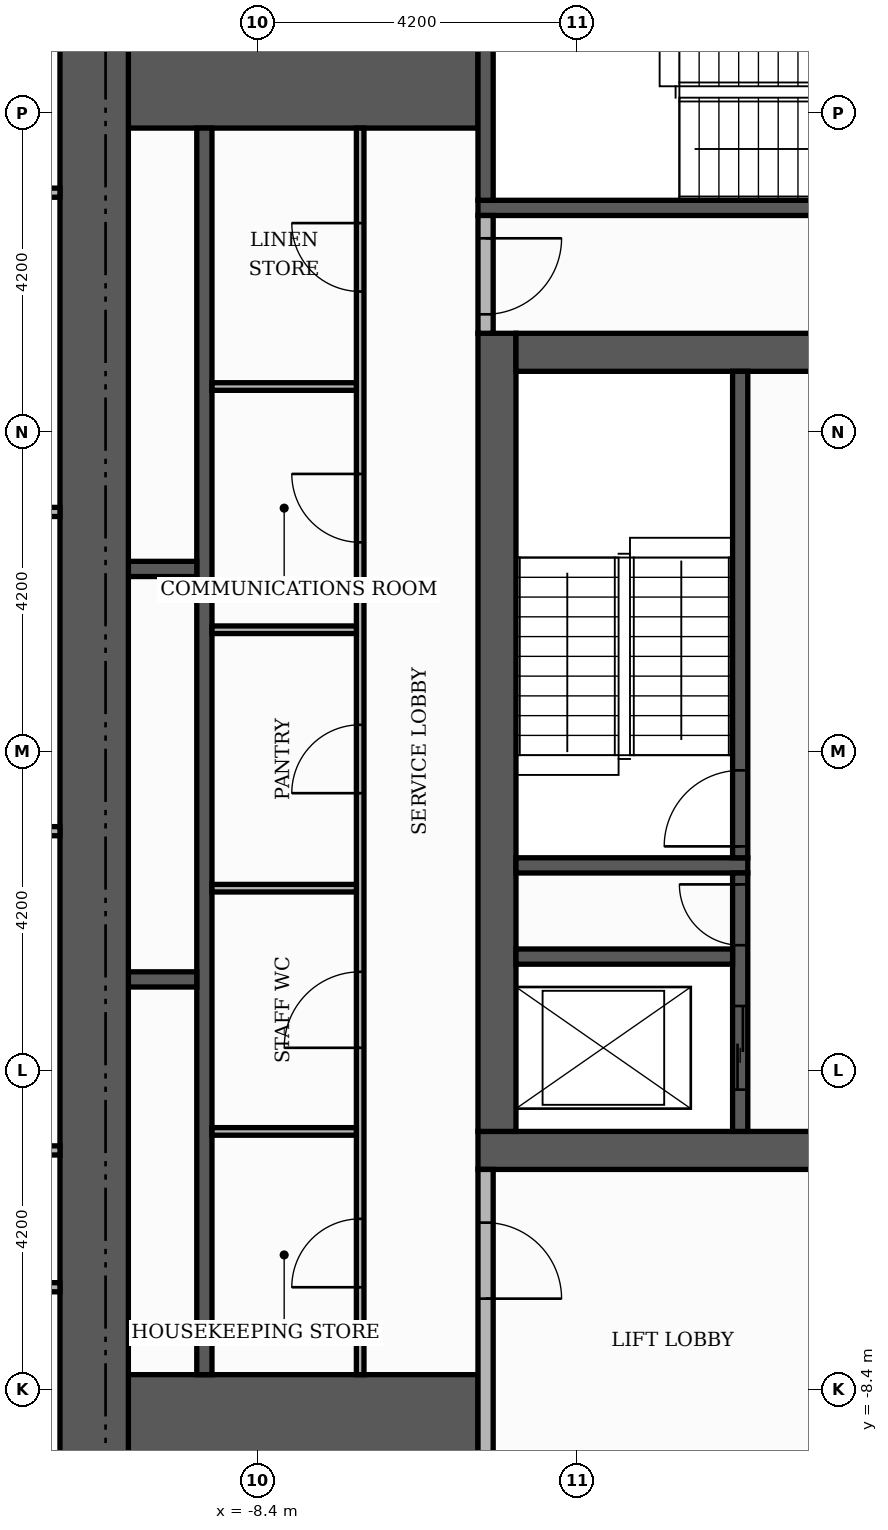
"""IFC4 building model, lengths in metres.
Left out: names, types, materials, properties, quantities, classifications, styles, units other than length and angle.
Written with IfcOpenShell. Run it as: python <this file> out.ifc"""

import sys

from ifc_helpers import new_model, si_unit, direction, frame, frame_2d, origin, place, context, subcontext, project, spatial, rectangle, extrude, element, fill, save


model = new_model("IFC4")
c1 = context("Model", 3, precision=1e-05, world=origin(), true_north=direction((0.0, 1.0)))
c2 = subcontext(c1, "Body", "Model", "MODEL_VIEW")
j1 = project(units=[si_unit("LENGTHUNIT", "METRE"), si_unit("PLANEANGLEUNIT", "RADIAN")], contexts=[c1])
p1 = place(None, origin())
s1 = spatial("IfcSite", under=j1, at=p1, CompositionType="ELEMENT")
p2 = place(p1, origin())
s2 = spatial("IfcBuilding", under=s1, at=p2, CompositionType="ELEMENT")
p3 = place(p2, frame((0.0, 0.0, 267.9)))
s3 = spatial("IfcBuildingStorey", under=s2, at=p3, CompositionType="ELEMENT", Elevation=267.9)
p4 = place(p3, frame((-5.5, -5.25, 0.0), z_axis=(0.0, 0.0, 1.0), x_axis=(1.0, 0.0, 0.0)))
e1 = element("IfcWall", 1, at=p4, inside=s3, PredefinedType="SHEAR", context=c2, shape_type="SweptSolid", body=[
    extrude(rectangle(XDim=11.0, YDim=0.5, at=frame_2d((5.5, 0.0))), origin(), (0.0, 0.0, 1.0), 3.48),
])
p5 = place(p4, frame((4.9, 0.0, 0.0)))
e2 = element("IfcOpeningElement", 2, at=p5, cuts=e1, PredefinedType="OPENING", context=c2, shape_type="SweptSolid", body=[
    extrude(rectangle(XDim=1.2, YDim=2.1, at=frame_2d((0.6, 1.05))), frame((0.0, 0.26, 0.0), z_axis=(0.0, -1.0, 0.0), x_axis=(1.0, 0.0, 0.0)), (0.0, 0.0, 1.0), 0.52),
])
p6 = place(p3, frame((-5.25, -5.0, 0.0), z_axis=(0.0, 0.0, 1.0), x_axis=(0.0, 1.0, 0.0)))
e3 = element("IfcWall", 3, at=p6, inside=s3, PredefinedType="SHEAR", context=c2, shape_type="SweptSolid", body=[
    extrude(rectangle(XDim=10.5, YDim=0.5, at=frame_2d((5.25, 0.0))), origin(), (0.0, 0.0, 1.0), 3.48),
])
p7 = place(p3, frame((-5.0, 5.25, 0.0), z_axis=(0.0, 0.0, 1.0), x_axis=(1.0, 0.0, 0.0)))
e4 = element("IfcWall", 4, at=p7, inside=s3, PredefinedType="SHEAR", context=c2, shape_type="SweptSolid", body=[
    extrude(rectangle(XDim=10.0, YDim=0.5, at=frame_2d((5.0, 0.0))), origin(), (0.0, 0.0, 1.0), 3.48),
])
p8 = place(p7, frame((4.4, 0.0, 0.0)))
e5 = element("IfcOpeningElement", 5, at=p8, cuts=e4, PredefinedType="OPENING", context=c2, shape_type="SweptSolid", body=[
    extrude(rectangle(XDim=1.2, YDim=2.1, at=frame_2d((0.6, 1.05))), frame((0.0, 0.26, 0.0), z_axis=(0.0, -1.0, 0.0), x_axis=(1.0, 0.0, 0.0)), (0.0, 0.0, 1.0), 0.52),
])
for number, where, z_axis, x_axis in (
    (6, (-10.1, -9.15, 0.0), (0.0, 0.0, 1.0), (1.0, 0.0, 0.0)),
    (7, (-10.1, 9.15, 0.0), (0.0, 0.0, 1.0), (1.0, 0.0, 0.0)),
):
    element("IfcWall", number, at=place(p3, frame(where, z_axis=z_axis, x_axis=x_axis)), inside=s3, PredefinedType="SHEAR", context=c2, shape_type="SweptSolid", body=[
        extrude(rectangle(XDim=4.6, YDim=1.9, at=frame_2d((2.3, 0.0))), origin(), (0.0, 0.0, 1.0), 3.48),
    ])
p9 = place(p3, frame((-5.0, -1.5, 0.0), z_axis=(0.0, 0.0, 1.0), x_axis=(1.0, 0.0, 0.0)))
e8 = element("IfcWall", 8, at=p9, inside=s3, PredefinedType="SHEAR", context=c2, shape_type="SweptSolid", body=[
    extrude(rectangle(XDim=3.05, YDim=0.2, at=frame_2d((1.525, 0.0))), origin(), (0.0, 0.0, 1.0), 3.48),
])
p10 = place(p3, frame((-2.05, -1.4, 0.0), z_axis=(0.0, 0.0, 1.0), x_axis=(0.0, 1.0, 0.0)))
e9 = element("IfcWall", 9, at=p10, inside=s3, PredefinedType="SHEAR", context=c2, shape_type="SweptSolid", body=[
    extrude(rectangle(XDim=6.4, YDim=0.2, at=frame_2d((3.2, 0.0))), origin(), (0.0, 0.0, 1.0), 3.48),
])
p11 = place(p10, frame((0.15, 0.0, 0.0)))
e10 = element("IfcOpeningElement", 10, at=p11, cuts=e9, PredefinedType="OPENING", context=c2, shape_type="SweptSolid", body=[
    extrude(rectangle(XDim=1.0, YDim=2.1, at=frame_2d((0.5, 1.05))), frame((0.0, 0.11, 0.0), z_axis=(0.0, -1.0, 0.0), x_axis=(1.0, 0.0, 0.0)), (0.0, 0.0, 1.0), 0.22),
])
p12 = place(p3, frame((-5.5, 7.15, 0.0), z_axis=(0.0, 0.0, 1.0), x_axis=(1.0, 0.0, 0.0)))
e11 = element("IfcWall", 11, at=p12, inside=s3, PredefinedType="SHEAR", context=c2, shape_type="SweptSolid", body=[
    extrude(rectangle(XDim=6.8, YDim=0.2, at=frame_2d((3.4, 0.0))), origin(), (0.0, 0.0, 1.0), 3.48),
])
p13 = place(p3, frame((-5.4, 7.25, 0.0), z_axis=(0.0, 0.0, 1.0), x_axis=(0.0, 1.0, 0.0)))
e12 = element("IfcWall", 12, at=p13, inside=s3, PredefinedType="SHEAR", context=c2, shape_type="SweptSolid", body=[
    extrude(rectangle(XDim=2.85, YDim=0.2, at=frame_2d((1.425, 0.0))), origin(), (0.0, 0.0, 1.0), 3.48),
])
p14 = place(p3, frame((-9.1, -8.2, 0.0), z_axis=(0.0, 0.0, 1.0), x_axis=(0.0, 1.0, 0.0)))
e13 = element("IfcWall", 13, at=p14, inside=s3, PredefinedType="SHEAR", context=c2, shape_type="SweptSolid", body=[
    extrude(rectangle(XDim=16.4, YDim=0.2, at=frame_2d((8.2, 0.0))), origin(), (0.0, 0.0, 1.0), 3.48),
])
p15 = place(p3, frame((-2.05, -5.0, 0.0), z_axis=(0.0, 0.0, 1.0), x_axis=(0.0, 1.0, 0.0)))
e14 = element("IfcWall", 14, at=p15, inside=s3, PredefinedType="SHEAR", context=c2, shape_type="SweptSolid", body=[
    extrude(rectangle(XDim=3.4, YDim=0.2, at=frame_2d((1.7, 0.0))), origin(), (0.0, 0.0, 1.0), 3.48),
])
p16 = place(p15, frame((0.55, 0.0, 0.0)))
e15 = element("IfcOpeningElement", 15, at=p16, cuts=e14, PredefinedType="OPENING", context=c2, shape_type="SweptSolid", body=[
    extrude(rectangle(XDim=1.1, YDim=2.1, at=frame_2d((0.55, 1.05))), frame((0.0, 0.11, 0.0), z_axis=(0.0, -1.0, 0.0), x_axis=(1.0, 0.0, 0.0)), (0.0, 0.0, 1.0), 0.22),
])
p17 = place(p15, frame((2.45, 0.0, 0.0)))
e16 = element("IfcOpeningElement", 16, at=p17, cuts=e14, PredefinedType="OPENING", context=c2, shape_type="SweptSolid", body=[
    extrude(rectangle(XDim=0.8, YDim=2.1, at=frame_2d((0.4, 1.05))), frame((0.0, 0.11, 0.0), z_axis=(0.0, -1.0, 0.0), x_axis=(1.0, 0.0, 0.0)), (0.0, 0.0, 1.0), 0.22),
])
p18 = place(p3, frame((-10.1, -3.0, 0.0), z_axis=(0.0, 0.0, 1.0), x_axis=(1.0, 0.0, 0.0)))
e17 = element("IfcWall", 17, at=p18, inside=s3, PredefinedType="SHEAR", context=c2, shape_type="SweptSolid", body=[
    extrude(rectangle(XDim=0.9, YDim=0.2, at=frame_2d((0.45, 0.0))), origin(), (0.0, 0.0, 1.0), 3.48),
])
p19 = place(p3, frame((-5.0, -2.7, 0.0), z_axis=(0.0, 0.0, 1.0), x_axis=(1.0, 0.0, 0.0)))
e18 = element("IfcWall", 18, at=p19, inside=s3, PredefinedType="SHEAR", context=c2, shape_type="SweptSolid", body=[
    extrude(rectangle(XDim=2.85, YDim=0.2, at=frame_2d((1.425, 0.0))), origin(), (0.0, 0.0, 1.0), 3.48),
])
p20 = place(p3, frame((-10.1, 2.4, 0.0), z_axis=(0.0, 0.0, 1.0), x_axis=(1.0, 0.0, 0.0)))
e19 = element("IfcWall", 19, at=p20, inside=s3, PredefinedType="SHEAR", context=c2, shape_type="SweptSolid", body=[
    extrude(rectangle(XDim=0.9, YDim=0.2, at=frame_2d((0.45, 0.0))), origin(), (0.0, 0.0, 1.0), 3.48),
])
p21 = place(p3, frame((-10.55, -10.1, 0.0), z_axis=(0.0, 0.0, 1.0), x_axis=(0.0, 1.0, 0.0)))
e20 = element("IfcWall", 20, at=p21, inside=s3, PredefinedType="SHEAR", context=c2, shape_type="SweptSolid", body=[
    extrude(rectangle(XDim=20.2, YDim=0.9, at=frame_2d((10.1, 0.0))), origin(), (0.0, 0.0, 1.0), 3.48),
])
p22 = place(p3, frame((-5.4, -10.1, 0.0), z_axis=(0.0, 0.0, 1.0), x_axis=(0.0, 1.0, 0.0)))
e21 = element("IfcWall", 21, at=p22, inside=s3, PredefinedType="PARTITIONING", context=c2, shape_type="SweptSolid", body=[
    extrude(rectangle(XDim=4.6, YDim=0.2, at=frame_2d((2.3, 0.0))), origin(), (0.0, 0.0, 1.0), 3.48),
])
p23 = place(p22, frame((2.9, 0.0, 0.0)))
e22 = element("IfcOpeningElement", 22, at=p23, cuts=e21, PredefinedType="OPENING", context=c2, shape_type="SweptSolid", body=[
    extrude(rectangle(XDim=1.0, YDim=2.1, at=frame_2d((0.5, 1.05))), frame((0.0, 0.11, 0.0), z_axis=(0.0, -1.0, 0.0), x_axis=(1.0, 0.0, 0.0)), (0.0, 0.0, 1.0), 0.22),
])
p24 = place(p3, frame((-7.05, -8.2, 0.0), z_axis=(0.0, 0.0, 1.0), x_axis=(0.0, 1.0, 0.0)))
e23 = element("IfcWall", 23, at=p24, inside=s3, PredefinedType="PARTITIONING", context=c2, shape_type="SweptSolid", body=[
    extrude(rectangle(XDim=16.4, YDim=0.1, at=frame_2d((8.2, 0.0))), origin(), (0.0, 0.0, 1.0), 3.48),
])
p25 = place(p24, frame((1.15, 0.0, 0.0)))
e24 = element("IfcOpeningElement", 24, at=p25, cuts=e23, PredefinedType="OPENING", context=c2, shape_type="SweptSolid", body=[
    extrude(rectangle(XDim=0.9, YDim=2.1, at=frame_2d((0.45, 1.05))), frame((0.0, 0.06, 0.0), z_axis=(0.0, -1.0, 0.0), x_axis=(1.0, 0.0, 0.0)), (0.0, 0.0, 1.0), 0.12),
])
p26 = place(p24, frame((4.3, 0.0, 0.0)))
e25 = element("IfcOpeningElement", 25, at=p26, cuts=e23, PredefinedType="OPENING", context=c2, shape_type="SweptSolid", body=[
    extrude(rectangle(XDim=1.0, YDim=2.1, at=frame_2d((0.5, 1.05))), frame((0.0, 0.06, 0.0), z_axis=(0.0, -1.0, 0.0), x_axis=(1.0, 0.0, 0.0)), (0.0, 0.0, 1.0), 0.12),
])
p27 = place(p24, frame((7.65, 0.0, 0.0)))
e26 = element("IfcOpeningElement", 26, at=p27, cuts=e23, PredefinedType="OPENING", context=c2, shape_type="SweptSolid", body=[
    extrude(rectangle(XDim=0.9, YDim=2.1, at=frame_2d((0.45, 1.05))), frame((0.0, 0.06, 0.0), z_axis=(0.0, -1.0, 0.0), x_axis=(1.0, 0.0, 0.0)), (0.0, 0.0, 1.0), 0.12),
])
p28 = place(p24, frame((10.95, 0.0, 0.0)))
e27 = element("IfcOpeningElement", 27, at=p28, cuts=e23, PredefinedType="OPENING", context=c2, shape_type="SweptSolid", body=[
    extrude(rectangle(XDim=0.9, YDim=2.1, at=frame_2d((0.45, 1.05))), frame((0.0, 0.06, 0.0), z_axis=(0.0, -1.0, 0.0), x_axis=(1.0, 0.0, 0.0)), (0.0, 0.0, 1.0), 0.12),
])
p29 = place(p24, frame((14.25, 0.0, 0.0)))
e28 = element("IfcOpeningElement", 28, at=p29, cuts=e23, PredefinedType="OPENING", context=c2, shape_type="SweptSolid", body=[
    extrude(rectangle(XDim=0.9, YDim=2.1, at=frame_2d((0.45, 1.05))), frame((0.0, 0.06, 0.0), z_axis=(0.0, -1.0, 0.0), x_axis=(1.0, 0.0, 0.0)), (0.0, 0.0, 1.0), 0.12),
])
for number, where, z_axis, x_axis in (
    (29, (-9.0, -5.0, 0.0), (0.0, 0.0, 1.0), (1.0, 0.0, 0.0)),
    (30, (-9.0, -1.8, 0.0), (0.0, 0.0, 1.0), (1.0, 0.0, 0.0)),
    (31, (-9.0, 1.6, 0.0), (0.0, 0.0, 1.0), (1.0, 0.0, 0.0)),
    (32, (-9.0, 4.8, 0.0), (0.0, 0.0, 1.0), (1.0, 0.0, 0.0)),
):
    element("IfcWall", number, at=place(p3, frame(where, z_axis=z_axis, x_axis=x_axis)), inside=s3, PredefinedType="PARTITIONING", context=c2, shape_type="SweptSolid", body=[
        extrude(rectangle(XDim=1.9, YDim=0.1, at=frame_2d((0.95, 0.0))), origin(), (0.0, 0.0, 1.0), 3.48),
    ])
p30 = place(p3, frame((-5.4, 5.5, 0.0), z_axis=(0.0, 0.0, 1.0), x_axis=(0.0, 1.0, 0.0)))
e33 = element("IfcWall", 33, at=p30, inside=s3, PredefinedType="PARTITIONING", context=c2, shape_type="SweptSolid", body=[
    extrude(rectangle(XDim=1.55, YDim=0.2, at=frame_2d((0.775, 0.0))), origin(), (0.0, 0.0, 1.0), 3.48),
])
p31 = place(p30, frame((0.25, 0.0, 0.0)))
e34 = element("IfcOpeningElement", 34, at=p31, cuts=e33, PredefinedType="OPENING", context=c2, shape_type="SweptSolid", body=[
    extrude(rectangle(XDim=1.0, YDim=2.1, at=frame_2d((0.5, 1.05))), frame((0.0, 0.11, 0.0), z_axis=(0.0, -1.0, 0.0), x_axis=(1.0, 0.0, 0.0)), (0.0, 0.0, 1.0), 0.22),
])
for number, where, z_axis, x_axis in (
    (35, (-18.92, -7.05, 0.0), (0.0, 0.0, 1.0), (1.0, 0.0, 0.0)),
    (36, (-18.92, -5.25, 0.0), (0.0, 0.0, 1.0), (1.0, 0.0, 0.0)),
    (37, (-18.92, -1.05, 0.0), (0.0, 0.0, 1.0), (1.0, 0.0, 0.0)),
    (38, (-18.92, 3.15, 0.0), (0.0, 0.0, 1.0), (1.0, 0.0, 0.0)),
):
    element("IfcWall", number, at=place(p3, frame(where, z_axis=z_axis, x_axis=x_axis)), inside=s3, PredefinedType="PARTITIONING", context=c2, shape_type="SweptSolid", body=[
        extrude(rectangle(XDim=7.92, YDim=0.12, at=frame_2d((3.96, 0.0))), origin(), (0.0, 0.0, 1.0), 3.48),
    ])
p32 = place(p3, frame((-18.92, 7.35, 0.0), z_axis=(0.0, 0.0, 1.0), x_axis=(1.0, 0.0, 0.0)))
e39 = element("IfcWall", 39, at=p32, inside=s3, PredefinedType="PARTITIONING", context=c2, shape_type="SweptSolid", body=[
    extrude(rectangle(XDim=7.92, YDim=0.12, at=frame_2d((3.96, 0.0))), origin(), (0.0, 0.0, 1.0), 3.48),
])
p33 = place(p32, frame((3.51, 0.0, 0.0)))
e40 = element("IfcOpeningElement", 40, at=p33, cuts=e39, PredefinedType="OPENING", context=c2, shape_type="SweptSolid", body=[
    extrude(rectangle(XDim=0.9, YDim=2.1, at=frame_2d((0.45, 1.05))), frame((0.0, 0.07, 0.0), z_axis=(0.0, -1.0, 0.0), x_axis=(1.0, 0.0, 0.0)), (0.0, 0.0, 1.0), 0.14),
])
p34 = place(p16, origin())
e41 = element("IfcDoor", 41, at=p34, inside=s3, OperationType="SLIDING_TO_LEFT", PredefinedType="DOOR", context=c2, shape_type="SweptSolid", body=[
    extrude(rectangle(XDim=1.1, YDim=2.1, at=frame_2d((0.55, 1.05))), frame((0.0, 0.025, 0.0), z_axis=(0.0, -1.0, 0.0), x_axis=(1.0, 0.0, 0.0)), (0.0, 0.0, 1.0), 0.05),
])
fill(e15, e41)
p35 = place(p11, origin())
e42 = element("IfcDoor", 42, at=p35, inside=s3, OperationType="SINGLE_SWING_LEFT", PredefinedType="DOOR", context=c2, shape_type="SweptSolid", body=[
    extrude(rectangle(XDim=1.0, YDim=2.1, at=frame_2d((0.5, 1.05))), frame((0.0, 0.025, 0.0), z_axis=(0.0, -1.0, 0.0), x_axis=(1.0, 0.0, 0.0)), (0.0, 0.0, 1.0), 0.05),
])
fill(e10, e42)
p36 = place(p17, origin())
e43 = element("IfcDoor", 43, at=p36, inside=s3, OperationType="SINGLE_SWING_RIGHT", PredefinedType="DOOR", context=c2, shape_type="SweptSolid", body=[
    extrude(rectangle(XDim=0.8, YDim=2.1, at=frame_2d((0.4, 1.05))), frame((0.0, 0.025, 0.0), z_axis=(0.0, -1.0, 0.0), x_axis=(1.0, 0.0, 0.0)), (0.0, 0.0, 1.0), 0.05),
])
fill(e16, e43)
p37 = place(p31, frame((1.0, 0.0, 0.0), z_axis=(0.0, 0.0, 1.0), x_axis=(-1.0, 0.0, 0.0)))
e44 = element("IfcDoor", 44, at=p37, inside=s3, OperationType="SINGLE_SWING_RIGHT", PredefinedType="DOOR", context=c2, shape_type="SweptSolid", body=[
    extrude(rectangle(XDim=1.0, YDim=2.1, at=frame_2d((0.5, 1.05))), frame((0.0, 0.025, 0.0), z_axis=(0.0, -1.0, 0.0), x_axis=(1.0, 0.0, 0.0)), (0.0, 0.0, 1.0), 0.05),
])
fill(e34, e44)
p38 = place(p23, frame((1.0, 0.0, 0.0), z_axis=(0.0, 0.0, 1.0), x_axis=(-1.0, 0.0, 0.0)))
e45 = element("IfcDoor", 45, at=p38, inside=s3, OperationType="SINGLE_SWING_LEFT", PredefinedType="DOOR", context=c2, shape_type="SweptSolid", body=[
    extrude(rectangle(XDim=1.0, YDim=2.1, at=frame_2d((0.5, 1.05))), frame((0.0, 0.025, 0.0), z_axis=(0.0, -1.0, 0.0), x_axis=(1.0, 0.0, 0.0)), (0.0, 0.0, 1.0), 0.05),
])
fill(e22, e45)
p39 = place(p25, origin())
e46 = element("IfcDoor", 46, at=p39, inside=s3, OperationType="SINGLE_SWING_LEFT", PredefinedType="DOOR", context=c2, shape_type="SweptSolid", body=[
    extrude(rectangle(XDim=0.9, YDim=2.1, at=frame_2d((0.45, 1.05))), frame((0.0, 0.025, 0.0), z_axis=(0.0, -1.0, 0.0), x_axis=(1.0, 0.0, 0.0)), (0.0, 0.0, 1.0), 0.05),
])
fill(e24, e46)
p40 = place(p26, origin())
e47 = element("IfcDoor", 47, at=p40, inside=s3, OperationType="SINGLE_SWING_LEFT", PredefinedType="DOOR", context=c2, shape_type="SweptSolid", body=[
    extrude(rectangle(XDim=1.0, YDim=2.1, at=frame_2d((0.5, 1.05))), frame((0.0, 0.025, 0.0), z_axis=(0.0, -1.0, 0.0), x_axis=(1.0, 0.0, 0.0)), (0.0, 0.0, 1.0), 0.05),
])
fill(e25, e47)
p41 = place(p27, origin())
e48 = element("IfcDoor", 48, at=p41, inside=s3, OperationType="SINGLE_SWING_LEFT", PredefinedType="DOOR", context=c2, shape_type="SweptSolid", body=[
    extrude(rectangle(XDim=0.9, YDim=2.1, at=frame_2d((0.45, 1.05))), frame((0.0, 0.025, 0.0), z_axis=(0.0, -1.0, 0.0), x_axis=(1.0, 0.0, 0.0)), (0.0, 0.0, 1.0), 0.05),
])
fill(e26, e48)
p42 = place(p28, origin())
e49 = element("IfcDoor", 49, at=p42, inside=s3, OperationType="SINGLE_SWING_RIGHT", PredefinedType="DOOR", context=c2, shape_type="SweptSolid", body=[
    extrude(rectangle(XDim=0.9, YDim=2.1, at=frame_2d((0.45, 1.05))), frame((0.0, 0.025, 0.0), z_axis=(0.0, -1.0, 0.0), x_axis=(1.0, 0.0, 0.0)), (0.0, 0.0, 1.0), 0.05),
])
fill(e27, e49)
p43 = place(p29, origin())
e50 = element("IfcDoor", 50, at=p43, inside=s3, OperationType="SINGLE_SWING_RIGHT", PredefinedType="DOOR", context=c2, shape_type="SweptSolid", body=[
    extrude(rectangle(XDim=0.9, YDim=2.1, at=frame_2d((0.45, 1.05))), frame((0.0, 0.025, 0.0), z_axis=(0.0, -1.0, 0.0), x_axis=(1.0, 0.0, 0.0)), (0.0, 0.0, 1.0), 0.05),
])
fill(e28, e50)
save(model, sys.argv[1])
